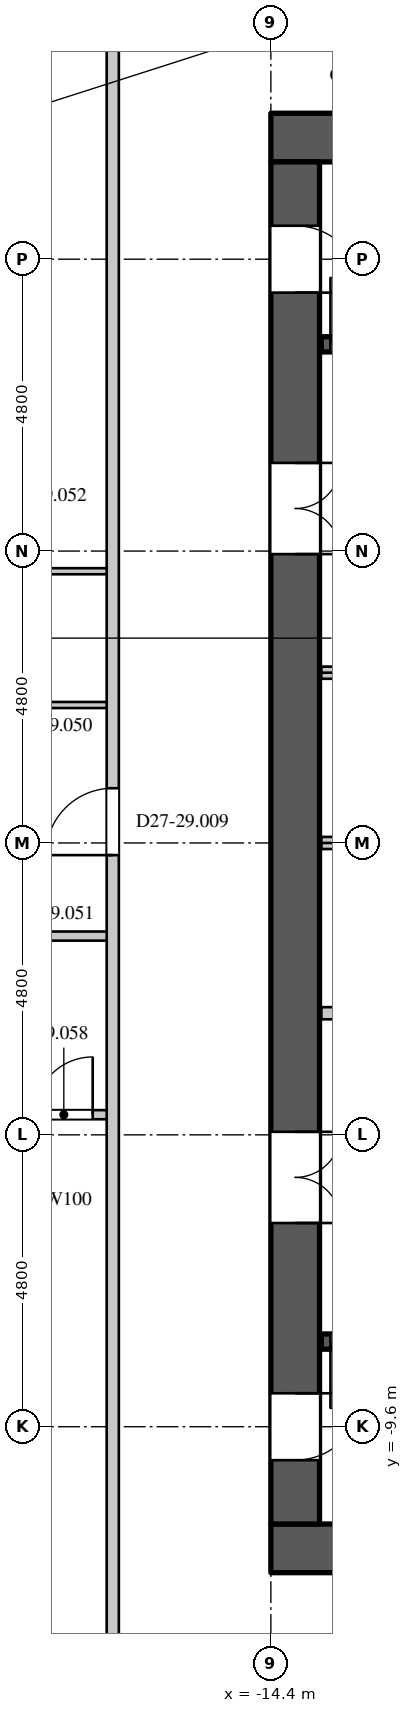
"""IFC4 building model, lengths in metres.
Left out: names, types, materials, properties, quantities, classifications, styles, units other than length and angle.
Written with IfcOpenShell. Run it as: python <this file> out.ifc"""

import sys

from ifc_helpers import new_model, si_unit, direction, frame, frame_2d, origin, place, context, subcontext, project, spatial, rectangle, extrude, element, fill, save


model = new_model("IFC4")
c1 = context("Model", 3, precision=1e-05, world=origin(), true_north=direction((0.0, 1.0)))
c2 = subcontext(c1, "Body", "Model", "MODEL_VIEW")
j1 = project(units=[si_unit("LENGTHUNIT", "METRE"), si_unit("PLANEANGLEUNIT", "RADIAN")], contexts=[c1])
p1 = place(None, origin())
s1 = spatial("IfcSite", under=j1, at=p1, CompositionType="ELEMENT")
p2 = place(p1, origin())
s2 = spatial("IfcBuilding", under=s1, at=p2, CompositionType="ELEMENT")
p3 = place(p2, frame((0.0, 0.0, 119.1)))
s3 = spatial("IfcBuildingStorey", under=s2, at=p3, CompositionType="ELEMENT", Elevation=119.1)
for number, where, z_axis, x_axis in (
    (1, (-14.4, 11.6, 0.0), (0.0, 0.0, 1.0), (1.0, 0.0, 0.0)),
    (2, (-14.4, -11.6, 0.0), (0.0, 0.0, 1.0), (1.0, 0.0, 0.0)),
):
    element("IfcWall", number, at=place(p3, frame(where, z_axis=z_axis, x_axis=x_axis)), inside=s3, PredefinedType="SHEAR", context=c2, shape_type="SweptSolid", body=[
        extrude(rectangle(XDim=28.8, YDim=0.8, at=frame_2d((14.4, 0.0))), origin(), (0.0, 0.0, 1.0), 4.2),
    ])
p4 = place(p3, frame((-14.0, -11.2, 0.0), z_axis=(0.0, 0.0, 1.0), x_axis=(0.0, 1.0, 0.0)))
e3 = element("IfcWall", 3, at=p4, inside=s3, PredefinedType="SHEAR", context=c2, shape_type="SweptSolid", body=[
    extrude(rectangle(XDim=22.4, YDim=0.8, at=frame_2d((11.2, 0.0))), origin(), (0.0, 0.0, 1.0), 4.2),
])
p5 = place(p4, frame((20.25, 0.0, 0.0)))
e4 = element("IfcOpeningElement", 4, at=p5, cuts=e3, PredefinedType="OPENING", context=c2, shape_type="SweptSolid", body=[
    extrude(rectangle(XDim=1.1, YDim=2.2, at=frame_2d((0.55, 1.1))), frame((0.0, 0.41, 0.0), z_axis=(0.0, -1.0, 0.0), x_axis=(1.0, 0.0, 0.0)), (0.0, 0.0, 1.0), 0.82),
])
p6 = place(p4, frame((1.05, 0.0, 0.0)))
e5 = element("IfcOpeningElement", 5, at=p6, cuts=e3, PredefinedType="OPENING", context=c2, shape_type="SweptSolid", body=[
    extrude(rectangle(XDim=1.1, YDim=2.2, at=frame_2d((0.55, 1.1))), frame((0.0, 0.41, 0.0), z_axis=(0.0, -1.0, 0.0), x_axis=(1.0, 0.0, 0.0)), (0.0, 0.0, 1.0), 0.82),
])
p7 = place(p4, frame((15.95, 0.0, 0.0)))
e6 = element("IfcOpeningElement", 6, at=p7, cuts=e3, PredefinedType="OPENING", context=c2, shape_type="SweptSolid", body=[
    extrude(rectangle(XDim=1.5, YDim=2.4, at=frame_2d((0.75, 1.2))), frame((0.0, 0.41, 0.0), z_axis=(0.0, -1.0, 0.0), x_axis=(1.0, 0.0, 0.0)), (0.0, 0.0, 1.0), 0.82),
])
p8 = place(p4, frame((4.95, 0.0, 0.0)))
e7 = element("IfcOpeningElement", 7, at=p8, cuts=e3, PredefinedType="OPENING", context=c2, shape_type="SweptSolid", body=[
    extrude(rectangle(XDim=1.5, YDim=2.4, at=frame_2d((0.75, 1.2))), frame((0.0, 0.41, 0.0), z_axis=(0.0, -1.0, 0.0), x_axis=(1.0, 0.0, 0.0)), (0.0, 0.0, 1.0), 0.82),
])
p9 = place(p3, frame((-17.0, -14.5, 0.0), z_axis=(0.0, 0.0, 1.0), x_axis=(0.0, 1.0, 0.0)))
e8 = element("IfcWall", 8, at=p9, inside=s3, PredefinedType="PARTITIONING", context=c2, shape_type="SweptSolid", body=[
    extrude(rectangle(XDim=29.0, YDim=0.2, at=frame_2d((14.5, 0.0))), origin(), (0.0, 0.0, 1.0), 3.95),
])
p10 = place(p9, frame((14.3, 0.0, 0.0)))
e9 = element("IfcOpeningElement", 9, at=p10, cuts=e8, PredefinedType="OPENING", context=c2, shape_type="SweptSolid", body=[
    extrude(rectangle(XDim=1.1, YDim=2.4, at=frame_2d((0.55, 1.2))), frame((0.0, 0.11, 0.0), z_axis=(0.0, -1.0, 0.0), x_axis=(1.0, 0.0, 0.0)), (0.0, 0.0, 1.0), 0.22),
])
p11 = place(p3, frame((-20.525, -1.531, 0.0), z_axis=(0.0, 0.0, 1.0), x_axis=(1.0, 0.0, 0.0)))
e10 = element("IfcWall", 10, at=p11, inside=s3, PredefinedType="PARTITIONING", context=c2, shape_type="SweptSolid", body=[
    extrude(rectangle(XDim=3.425, YDim=0.15, at=frame_2d((1.712, 0.0))), origin(), (0.0, 0.0, 1.0), 3.95),
])
p12 = place(p11, frame((0.65, 0.0, 0.0)))
e11 = element("IfcOpeningElement", 11, at=p12, cuts=e10, PredefinedType="OPENING", context=c2, shape_type="SweptSolid", body=[
    extrude(rectangle(XDim=0.95, YDim=2.2, at=frame_2d((0.475, 1.1))), frame((0.0, 0.085, 0.0), z_axis=(0.0, -1.0, 0.0), x_axis=(1.0, 0.0, 0.0)), (0.0, 0.0, 1.0), 0.17),
])
p13 = place(p3, frame((-18.58, -4.469, 0.0), z_axis=(0.0, 0.0, 1.0), x_axis=(1.0, 0.0, 0.0)))
e12 = element("IfcWall", 12, at=p13, inside=s3, PredefinedType="PARTITIONING", context=c2, shape_type="SweptSolid", body=[
    extrude(rectangle(XDim=1.48, YDim=0.15, at=frame_2d((0.74, 0.0))), origin(), (0.0, 0.0, 1.0), 3.3),
])
p14 = place(p13, frame((0.3, 0.0, 0.0)))
e13 = element("IfcOpeningElement", 13, at=p14, cuts=e12, PredefinedType="OPENING", context=c2, shape_type="SweptSolid", body=[
    extrude(rectangle(XDim=0.95, YDim=2.2, at=frame_2d((0.475, 1.1))), frame((0.0, 0.085, 0.0), z_axis=(0.0, -1.0, 0.0), x_axis=(1.0, 0.0, 0.0)), (0.0, 0.0, 1.0), 0.17),
])
p15 = place(p3, frame((-13.57, -2.8, 0.0), z_axis=(0.0, 0.0, 1.0), x_axis=(1.0, 0.0, 0.0)))
e14 = element("IfcWall", 14, at=p15, inside=s3, PredefinedType="PARTITIONING", context=c2, shape_type="SweptSolid", body=[
    extrude(rectangle(XDim=3.19, YDim=0.2, at=frame_2d((1.595, 0.0))), origin(), (0.0, 0.0, 1.0), 3.95),
])
p16 = place(p15, frame((1.25, 0.0, 0.0)))
e15 = element("IfcOpeningElement", 15, at=p16, cuts=e14, PredefinedType="OPENING", context=c2, shape_type="SweptSolid", body=[
    extrude(rectangle(XDim=0.6, YDim=2.0, at=frame_2d((0.3, 1.0))), frame((0.0, 0.11, 0.0), z_axis=(0.0, -1.0, 0.0), x_axis=(1.0, 0.0, 0.0)), (0.0, 0.0, 1.0), 0.22),
])
p17 = place(p3, frame((-13.57, 0.0, 0.0), z_axis=(0.0, 0.0, 1.0), x_axis=(1.0, 0.0, 0.0)))
e16 = element("IfcWall", 16, at=p17, inside=s3, PredefinedType="PARTITIONING", context=c2, shape_type="SweptSolid", body=[
    extrude(rectangle(XDim=23.97, YDim=0.2, at=frame_2d((11.985, 0.0))), origin(), (0.0, 0.0, 1.0), 3.95),
])
p18 = place(p3, frame((-13.57, 2.8, 0.0), z_axis=(0.0, 0.0, 1.0), x_axis=(1.0, 0.0, 0.0)))
e17 = element("IfcWall", 17, at=p18, inside=s3, PredefinedType="PARTITIONING", context=c2, shape_type="SweptSolid", body=[
    extrude(rectangle(XDim=23.97, YDim=0.2, at=frame_2d((11.985, 0.0))), origin(), (0.0, 0.0, 1.0), 3.95),
])
p19 = place(p18, frame((1.0, 0.0, 0.0)))
e18 = element("IfcOpeningElement", 18, at=p19, cuts=e17, PredefinedType="OPENING", context=c2, shape_type="SweptSolid", body=[
    extrude(rectangle(XDim=1.1, YDim=2.2, at=frame_2d((0.55, 1.1))), frame((0.0, 0.11, 0.0), z_axis=(0.0, -1.0, 0.0), x_axis=(1.0, 0.0, 0.0)), (0.0, 0.0, 1.0), 0.22),
])
p20 = place(p18, frame((3.9, 0.0, 0.0)))
e19 = element("IfcOpeningElement", 19, at=p20, cuts=e17, PredefinedType="OPENING", context=c2, shape_type="SweptSolid", body=[
    extrude(rectangle(XDim=1.1, YDim=2.2, at=frame_2d((0.55, 1.1))), frame((0.0, 0.11, 0.0), z_axis=(0.0, -1.0, 0.0), x_axis=(1.0, 0.0, 0.0)), (0.0, 0.0, 1.0), 0.22),
])
p21 = place(p18, frame((6.5, 0.0, 0.0)))
e20 = element("IfcOpeningElement", 20, at=p21, cuts=e17, PredefinedType="OPENING", context=c2, shape_type="SweptSolid", body=[
    extrude(rectangle(XDim=1.1, YDim=2.2, at=frame_2d((0.55, 1.1))), frame((0.0, 0.11, 0.0), z_axis=(0.0, -1.0, 0.0), x_axis=(1.0, 0.0, 0.0)), (0.0, 0.0, 1.0), 0.22),
])
p22 = place(p18, frame((9.1, 0.0, 0.0)))
e21 = element("IfcOpeningElement", 21, at=p22, cuts=e17, PredefinedType="OPENING", context=c2, shape_type="SweptSolid", body=[
    extrude(rectangle(XDim=1.1, YDim=2.2, at=frame_2d((0.55, 1.1))), frame((0.0, 0.11, 0.0), z_axis=(0.0, -1.0, 0.0), x_axis=(1.0, 0.0, 0.0)), (0.0, 0.0, 1.0), 0.22),
])
p23 = place(p18, frame((11.7, 0.0, 0.0)))
e22 = element("IfcOpeningElement", 22, at=p23, cuts=e17, PredefinedType="OPENING", context=c2, shape_type="SweptSolid", body=[
    extrude(rectangle(XDim=1.1, YDim=2.2, at=frame_2d((0.55, 1.1))), frame((0.0, 0.11, 0.0), z_axis=(0.0, -1.0, 0.0), x_axis=(1.0, 0.0, 0.0)), (0.0, 0.0, 1.0), 0.22),
])
p24 = place(p18, frame((14.3, 0.0, 0.0)))
e23 = element("IfcOpeningElement", 23, at=p24, cuts=e17, PredefinedType="OPENING", context=c2, shape_type="SweptSolid", body=[
    extrude(rectangle(XDim=1.1, YDim=2.2, at=frame_2d((0.55, 1.1))), frame((0.0, 0.11, 0.0), z_axis=(0.0, -1.0, 0.0), x_axis=(1.0, 0.0, 0.0)), (0.0, 0.0, 1.0), 0.22),
])
p25 = place(p18, frame((16.9, 0.0, 0.0)))
e24 = element("IfcOpeningElement", 24, at=p25, cuts=e17, PredefinedType="OPENING", context=c2, shape_type="SweptSolid", body=[
    extrude(rectangle(XDim=1.1, YDim=2.2, at=frame_2d((0.55, 1.1))), frame((0.0, 0.11, 0.0), z_axis=(0.0, -1.0, 0.0), x_axis=(1.0, 0.0, 0.0)), (0.0, 0.0, 1.0), 0.22),
])
p26 = place(p18, frame((19.5, 0.0, 0.0)))
e25 = element("IfcOpeningElement", 25, at=p26, cuts=e17, PredefinedType="OPENING", context=c2, shape_type="SweptSolid", body=[
    extrude(rectangle(XDim=1.1, YDim=2.2, at=frame_2d((0.55, 1.1))), frame((0.0, 0.11, 0.0), z_axis=(0.0, -1.0, 0.0), x_axis=(1.0, 0.0, 0.0)), (0.0, 0.0, 1.0), 0.22),
])
p27 = place(p3, frame((-13.57, -8.2, 0.0), z_axis=(0.0, 0.0, 1.0), x_axis=(1.0, 0.0, 0.0)))
e26 = element("IfcWall", 26, at=p27, inside=s3, PredefinedType="SHEAR", context=c2, shape_type="SweptSolid", body=[
    extrude(rectangle(XDim=8.295, YDim=0.25, at=frame_2d((4.147, 0.0))), origin(), (0.0, 0.0, 1.0), 3.95),
])
p28 = place(p27, frame((0.15, 0.0, 0.0)))
e27 = element("IfcOpeningElement", 27, at=p28, cuts=e26, PredefinedType="OPENING", context=c2, shape_type="SweptSolid", body=[
    extrude(rectangle(XDim=1.1, YDim=2.2, at=frame_2d((0.55, 1.1))), frame((0.0, 0.135, 0.0), z_axis=(0.0, -1.0, 0.0), x_axis=(1.0, 0.0, 0.0)), (0.0, 0.0, 1.0), 0.27),
])
p29 = place(p3, frame((-13.57, 8.2, 0.0), z_axis=(0.0, 0.0, 1.0), x_axis=(1.0, 0.0, 0.0)))
e28 = element("IfcWall", 28, at=p29, inside=s3, PredefinedType="SHEAR", context=c2, shape_type="SweptSolid", body=[
    extrude(rectangle(XDim=8.295, YDim=0.25, at=frame_2d((4.147, 0.0))), origin(), (0.0, 0.0, 1.0), 3.95),
])
p30 = place(p29, frame((0.15, 0.0, 0.0)))
e29 = element("IfcOpeningElement", 29, at=p30, cuts=e28, PredefinedType="OPENING", context=c2, shape_type="SweptSolid", body=[
    extrude(rectangle(XDim=1.1, YDim=2.2, at=frame_2d((0.55, 1.1))), frame((0.0, 0.135, 0.0), z_axis=(0.0, -1.0, 0.0), x_axis=(1.0, 0.0, 0.0)), (0.0, 0.0, 1.0), 0.27),
])
p31 = place(p3, frame((-20.58, 4.469, 0.0), z_axis=(0.0, 0.0, 1.0), x_axis=(1.0, 0.0, 0.0)))
e30 = element("IfcWall", 30, at=p31, inside=s3, PredefinedType="PARTITIONING", context=c2, shape_type="SweptSolid", body=[
    extrude(rectangle(XDim=3.48, YDim=0.1, at=frame_2d((1.74, 0.0))), origin(), (0.0, 0.0, 1.0), 3.3),
])
p32 = place(p31, frame((0.7, 0.0, 0.0)))
e31 = element("IfcOpeningElement", 31, at=p32, cuts=e30, PredefinedType="OPENING", context=c2, shape_type="SweptSolid", body=[
    extrude(rectangle(XDim=0.9, YDim=2.2, at=frame_2d((0.45, 1.1))), frame((0.0, 0.06, 0.0), z_axis=(0.0, -1.0, 0.0), x_axis=(1.0, 0.0, 0.0)), (0.0, 0.0, 1.0), 0.12),
])
p33 = place(p3, frame((-20.525, 2.269, 0.0), z_axis=(0.0, 0.0, 1.0), x_axis=(1.0, 0.0, 0.0)))
e32 = element("IfcWall", 32, at=p33, inside=s3, PredefinedType="PARTITIONING", context=c2, shape_type="SweptSolid", body=[
    extrude(rectangle(XDim=3.425, YDim=0.1, at=frame_2d((1.712, 0.0))), origin(), (0.0, 0.0, 1.0), 3.95),
])
p34 = place(p33, frame((0.65, 0.0, 0.0)))
e33 = element("IfcOpeningElement", 33, at=p34, cuts=e32, PredefinedType="OPENING", context=c2, shape_type="SweptSolid", body=[
    extrude(rectangle(XDim=0.9, YDim=2.2, at=frame_2d((0.45, 1.1))), frame((0.0, 0.06, 0.0), z_axis=(0.0, -1.0, 0.0), x_axis=(1.0, 0.0, 0.0)), (0.0, 0.0, 1.0), 0.12),
])
p35 = place(p30, origin())
e34 = element("IfcDoor", 34, at=p35, inside=s3, OperationType="SINGLE_SWING_LEFT", PredefinedType="DOOR", context=c2, shape_type="SweptSolid", body=[
    extrude(rectangle(XDim=1.1, YDim=2.2, at=frame_2d((0.55, 1.1))), frame((0.0, 0.025, 0.0), z_axis=(0.0, -1.0, 0.0), x_axis=(1.0, 0.0, 0.0)), (0.0, 0.0, 1.0), 0.05),
])
fill(e29, e34)
p36 = place(p28, origin())
e35 = element("IfcDoor", 35, at=p36, inside=s3, OperationType="SINGLE_SWING_RIGHT", PredefinedType="DOOR", context=c2, shape_type="SweptSolid", body=[
    extrude(rectangle(XDim=1.1, YDim=2.2, at=frame_2d((0.55, 1.1))), frame((0.0, 0.025, 0.0), z_axis=(0.0, -1.0, 0.0), x_axis=(1.0, 0.0, 0.0)), (0.0, 0.0, 1.0), 0.05),
])
fill(e27, e35)
p37 = place(p5, origin())
e36 = element("IfcDoor", 36, at=p37, inside=s3, OperationType="SINGLE_SWING_RIGHT", PredefinedType="DOOR", context=c2, shape_type="SweptSolid", body=[
    extrude(rectangle(XDim=1.1, YDim=2.2, at=frame_2d((0.55, 1.1))), frame((0.0, -0.345, 0.0), z_axis=(0.0, -1.0, 0.0), x_axis=(1.0, 0.0, 0.0)), (0.0, 0.0, 1.0), 0.05),
])
fill(e4, e36)
p38 = place(p6, origin())
e37 = element("IfcDoor", 37, at=p38, inside=s3, OperationType="SINGLE_SWING_LEFT", PredefinedType="DOOR", context=c2, shape_type="SweptSolid", body=[
    extrude(rectangle(XDim=1.1, YDim=2.2, at=frame_2d((0.55, 1.1))), frame((0.0, -0.345, 0.0), z_axis=(0.0, -1.0, 0.0), x_axis=(1.0, 0.0, 0.0)), (0.0, 0.0, 1.0), 0.05),
])
fill(e5, e37)
p39 = place(p7, origin())
e38 = element("IfcDoor", 38, at=p39, inside=s3, OperationType="DOUBLE_DOOR_SINGLE_SWING", PredefinedType="DOOR", context=c2, shape_type="SweptSolid", body=[
    extrude(rectangle(XDim=1.5, YDim=2.4, at=frame_2d((0.75, 1.2))), frame((0.0, -0.345, 0.0), z_axis=(0.0, -1.0, 0.0), x_axis=(1.0, 0.0, 0.0)), (0.0, 0.0, 1.0), 0.05),
])
fill(e6, e38)
p40 = place(p8, origin())
e39 = element("IfcDoor", 39, at=p40, inside=s3, OperationType="DOUBLE_DOOR_SINGLE_SWING", PredefinedType="DOOR", context=c2, shape_type="SweptSolid", body=[
    extrude(rectangle(XDim=1.5, YDim=2.4, at=frame_2d((0.75, 1.2))), frame((0.0, -0.345, 0.0), z_axis=(0.0, -1.0, 0.0), x_axis=(1.0, 0.0, 0.0)), (0.0, 0.0, 1.0), 0.05),
])
fill(e7, e39)
p41 = place(p14, origin())
e40 = element("IfcDoor", 40, at=p41, inside=s3, OperationType="SINGLE_SWING_RIGHT", PredefinedType="DOOR", context=c2, shape_type="SweptSolid", body=[
    extrude(rectangle(XDim=0.95, YDim=2.2, at=frame_2d((0.475, 1.1))), frame((0.0, 0.025, 0.0), z_axis=(0.0, -1.0, 0.0), x_axis=(1.0, 0.0, 0.0)), (0.0, 0.0, 1.0), 0.05),
])
fill(e13, e40)
p42 = place(p10, origin())
e41 = element("IfcDoor", 41, at=p42, inside=s3, OperationType="SINGLE_SWING_LEFT", PredefinedType="DOOR", context=c2, shape_type="SweptSolid", body=[
    extrude(rectangle(XDim=1.1, YDim=2.4, at=frame_2d((0.55, 1.2))), frame((0.0, 0.025, 0.0), z_axis=(0.0, -1.0, 0.0), x_axis=(1.0, 0.0, 0.0)), (0.0, 0.0, 1.0), 0.05),
])
fill(e9, e41)
save(model, sys.argv[1])
